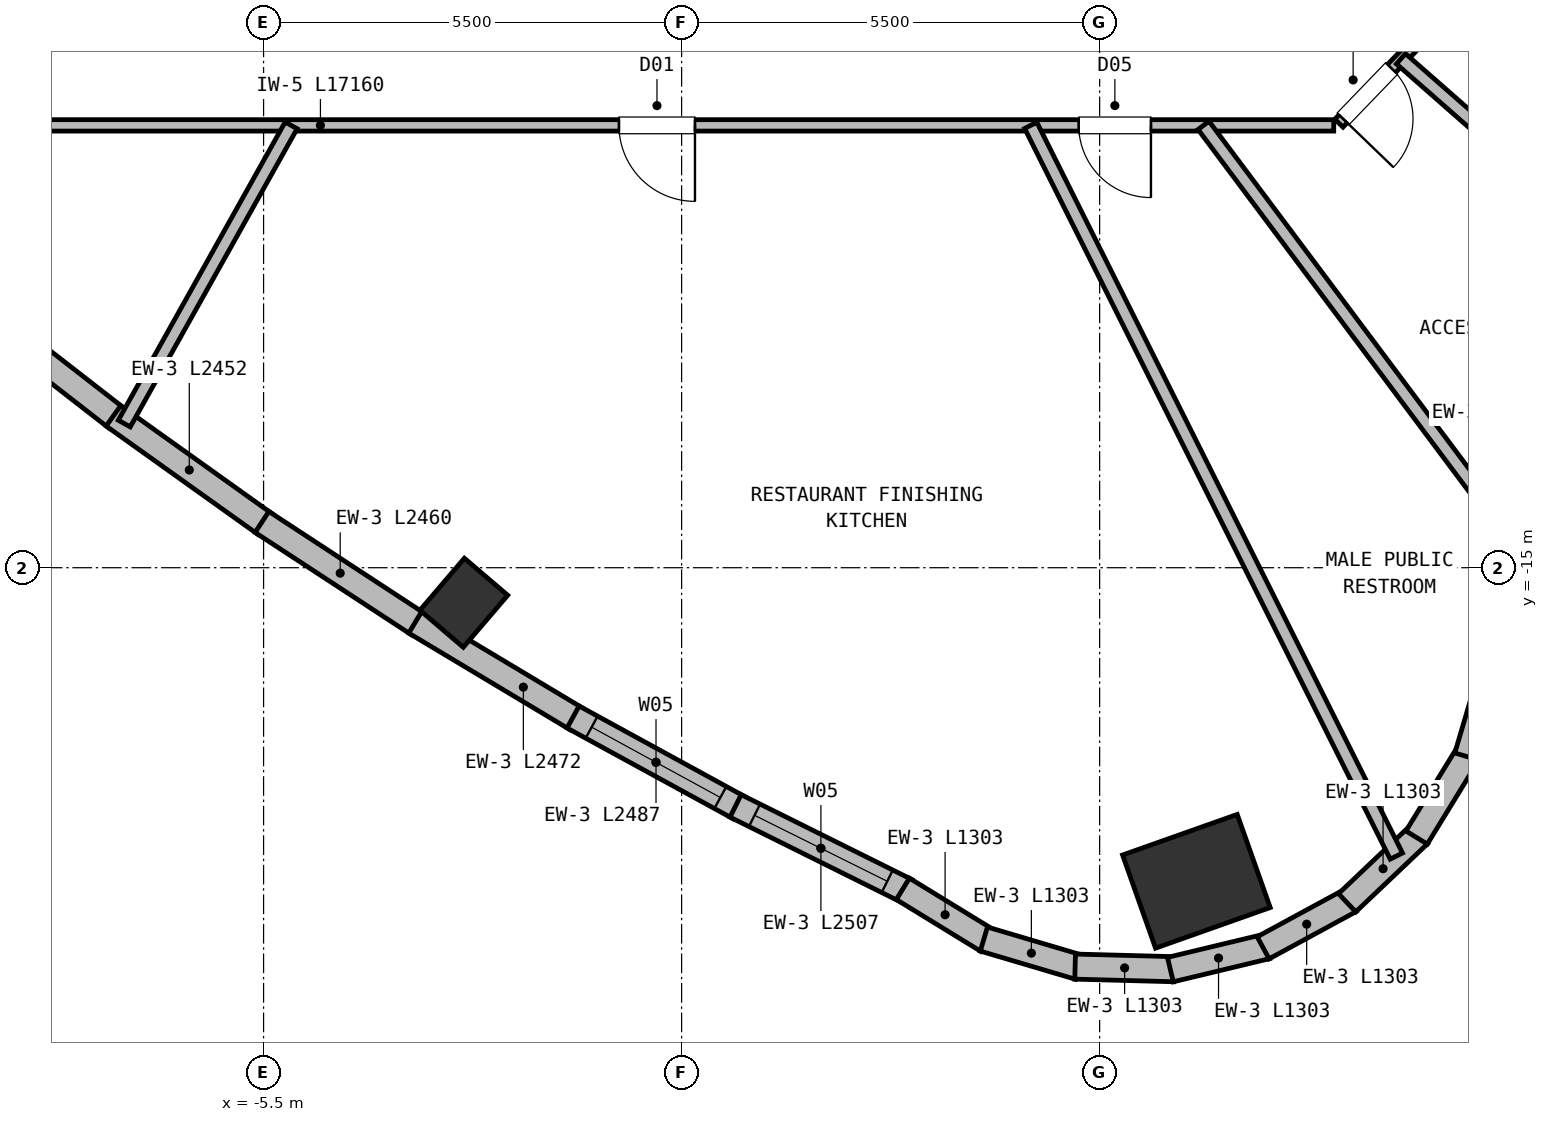
"""IFC4 building model, lengths in metres.
Left out: names, types, materials, properties, quantities, classifications, styles, units other than length and angle.
Written with IfcOpenShell. Run it as: python <this file> out.ifc"""

import sys

from ifc_helpers import new_model, si_unit, direction, frame, frame_2d, origin, origin_2d, place, context, subcontext, project, spatial, rectangle, extrude, element, fill, save


model = new_model("IFC4")
c1 = context("Model", 3, precision=1e-05, world=origin(), true_north=direction((0.0, 1.0)))
c2 = subcontext(c1, "Body", "Model", "MODEL_VIEW")
j1 = project(units=[si_unit("LENGTHUNIT", "METRE"), si_unit("PLANEANGLEUNIT", "RADIAN")], contexts=[c1])
p1 = place(None, origin())
s1 = spatial("IfcSite", under=j1, at=p1, CompositionType="ELEMENT")
p2 = place(p1, origin())
s2 = spatial("IfcBuilding", under=s1, at=p2, CompositionType="ELEMENT")
p3 = place(p2, frame((0.0, 0.0, 277.2)))
s3 = spatial("IfcBuildingStorey", under=s2, at=p3, CompositionType="ELEMENT", Elevation=277.2)
p4 = place(p3, frame((-2.865, -15.461, 0.0), z_axis=(0.0, 0.0, 1.0), x_axis=(-0.7604059656, 0.64944804833, 0.0)))
e1 = element("IfcColumn", 1, at=p4, inside=s3, PredefinedType="COLUMN", context=c2, shape_type="SweptSolid", body=[
    extrude(rectangle(XDim=0.75, YDim=0.9, at=origin_2d()), origin(), (0.0, 0.0, 1.0), 4.4),
])
p5 = place(p3, frame((6.773, -19.126, 0.0), z_axis=(0.0, 0.0, 1.0), x_axis=(-0.333806859234, 0.942641491092, 0.0)))
e2 = element("IfcColumn", 2, at=p5, inside=s3, PredefinedType="COLUMN", context=c2, shape_type="SweptSolid", body=[
    extrude(rectangle(XDim=1.3, YDim=1.6, at=origin_2d()), origin(), (0.0, 0.0, 1.0), 4.4),
])
p6 = place(p3, frame((-7.435, -13.031, 0.0), z_axis=(0.0, 0.0, 1.0), x_axis=(-0.789786954421, 0.613381257152, 0.0)))
e3 = element("IfcWall", 3, at=p6, inside=s3, PredefinedType="SOLIDWALL", context=c2, shape_type="SweptSolid", body=[
    extrude(rectangle(XDim=2.448, YDim=0.33, at=frame_2d((1.224, 0.0))), origin(), (0.0, 0.0, 1.0), 4.15),
])
p7 = place(p3, frame((-5.48, -14.427, 0.0), z_axis=(0.0, 0.0, 1.0), x_axis=(-0.813854547638, 0.581068649378, 0.0)))
e4 = element("IfcWall", 4, at=p7, inside=s3, PredefinedType="SOLIDWALL", context=c2, shape_type="SweptSolid", body=[
    extrude(rectangle(XDim=2.452, YDim=0.33, at=frame_2d((1.226, 0.0))), origin(), (0.0, 0.0, 1.0), 4.15),
])
p8 = place(p3, frame((-3.463, -15.746, 0.0), z_axis=(0.0, 0.0, 1.0), x_axis=(-0.8366477668, 0.547741284101, 0.0)))
e5 = element("IfcWall", 5, at=p8, inside=s3, PredefinedType="SOLIDWALL", context=c2, shape_type="SweptSolid", body=[
    extrude(rectangle(XDim=2.46, YDim=0.33, at=frame_2d((1.23, 0.0))), origin(), (0.0, 0.0, 1.0), 4.15),
])
p9 = place(p3, frame((-1.385, -16.989, 0.0), z_axis=(0.0, 0.0, 1.0), x_axis=(-0.857841338579, 0.513914621143, 0.0)))
e6 = element("IfcWall", 6, at=p9, inside=s3, PredefinedType="SOLIDWALL", context=c2, shape_type="SweptSolid", body=[
    extrude(rectangle(XDim=2.472, YDim=0.33, at=frame_2d((1.236, 0.0))), origin(), (0.0, 0.0, 1.0), 4.15),
])
p10 = place(p3, frame((0.754, -18.157, 0.0), z_axis=(0.0, 0.0, 1.0), x_axis=(-0.877475074231, 0.479622241044, 0.0)))
e7 = element("IfcWall", 7, at=p10, inside=s3, PredefinedType="SOLIDWALL", context=c2, shape_type="SweptSolid", body=[
    extrude(rectangle(XDim=2.487, YDim=0.33, at=frame_2d((1.244, 0.0))), origin(), (0.0, 0.0, 1.0), 4.15),
])
p11 = place(p10, frame((0.279, 0.0, 0.72)))
e8 = element("IfcOpeningElement", 8, at=p11, cuts=e7, PredefinedType="OPENING", context=c2, shape_type="SweptSolid", body=[
    extrude(rectangle(XDim=1.93, YDim=2.15, at=frame_2d((0.965, 1.075))), frame((0.0, 0.175, 0.0), z_axis=(0.0, -1.0, 0.0), x_axis=(1.0, 0.0, 0.0)), (0.0, 0.0, 1.0), 0.35),
])
p12 = place(p3, frame((2.955, -19.25, 0.0), z_axis=(0.0, 0.0, 1.0), x_axis=(-0.895515434076, 0.445030456634, 0.0)))
e9 = element("IfcWall", 9, at=p12, inside=s3, PredefinedType="SOLIDWALL", context=c2, shape_type="SweptSolid", body=[
    extrude(rectangle(XDim=2.507, YDim=0.33, at=frame_2d((1.253, 0.0))), origin(), (0.0, 0.0, 1.0), 4.15),
])
p13 = place(p12, frame((0.278, 0.0, 0.72)))
e10 = element("IfcOpeningElement", 10, at=p13, cuts=e9, PredefinedType="OPENING", context=c2, shape_type="SweptSolid", body=[
    extrude(rectangle(XDim=1.95, YDim=2.15, at=frame_2d((0.975, 1.075))), frame((0.0, 0.175, 0.0), z_axis=(0.0, -1.0, 0.0), x_axis=(1.0, 0.0, 0.0)), (0.0, 0.0, 1.0), 0.35),
])
for number, where, z_axis, x_axis in (
    (11, (4.022, -19.906, 0.0), (0.0, 0.0, 1.0), (-0.853, 0.523, 0.0)),
    (12, (5.226, -20.256, 0.0), (0.0, 0.0, 1.0), (-0.959, 0.284, 0.0)),
):
    element("IfcWall", number, at=place(p3, frame(where, z_axis=z_axis, x_axis=x_axis)), inside=s3, PredefinedType="SOLIDWALL", context=c2, shape_type="SweptSolid", body=[
        extrude(rectangle(XDim=1.303, YDim=0.33, at=frame_2d((0.652, 0.0))), origin(), (0.0, 0.0, 1.0), 4.15),
    ])
for number, where, z_axis, x_axis in (
    (13, (6.48, -20.283, 0.0), (0.0, 0.0, 1.0), (-1.0, 0.026, 0.0)),
    (14, (7.698, -19.984, 0.0), (0.0, 0.0, 1.0), (-0.972, -0.233, 0.0)),
    (15, (8.796, -19.38, 0.0), (0.0, 0.0, 1.0), (-0.879, -0.477, 0.0)),
):
    element("IfcWall", number, at=place(p3, frame(where, z_axis=z_axis, x_axis=x_axis)), inside=s3, PredefinedType="SOLIDWALL", context=c2, shape_type="SweptSolid", body=[
        extrude(rectangle(XDim=1.303, YDim=0.33, at=frame_2d((0.651, 0.0))), origin(), (0.0, 0.0, 1.0), 4.15),
    ])
p14 = place(p3, frame((9.701, -18.512, 0.0), z_axis=(0.0, 0.0, 1.0), x_axis=(-0.725415712612, -0.688311008118, 0.0)))
e16 = element("IfcWall", 16, at=p14, inside=s3, PredefinedType="SOLIDWALL", context=c2, shape_type="SweptSolid", body=[
    extrude(rectangle(XDim=1.303, YDim=0.33, at=frame_2d((0.651, 0.0))), origin(), (0.0, 0.0, 1.0), 4.15),
])
p15 = place(p3, frame((10.351, -17.439, 0.0), z_axis=(0.0, 0.0, 1.0), x_axis=(-0.522601602676, -0.852577014047, 0.0)))
e17 = element("IfcWall", 17, at=p15, inside=s3, PredefinedType="SOLIDWALL", context=c2, shape_type="SweptSolid", body=[
    extrude(rectangle(XDim=1.303, YDim=0.33, at=frame_2d((0.651, 0.0))), origin(), (0.0, 0.0, 1.0), 4.15),
])
p16 = place(p3, frame((10.701, -16.235, 0.0), z_axis=(0.0, 0.0, 1.0), x_axis=(-0.284011785169, -0.958820789243, 0.0)))
e18 = element("IfcWall", 18, at=p16, inside=s3, PredefinedType="SOLIDWALL", context=c2, shape_type="SweptSolid", body=[
    extrude(rectangle(XDim=1.303, YDim=0.33, at=frame_2d((0.652, 0.0))), origin(), (0.0, 0.0, 1.0), 4.15),
])
p17 = place(p3, frame((8.58, -9.18, 0.0), z_axis=(0.0, 0.0, 1.0), x_axis=(-1.0, 0.0, 0.0)))
e19 = element("IfcWall", 19, at=p17, inside=s3, PredefinedType="PARTITIONING", context=c2, shape_type="SweptSolid", body=[
    extrude(rectangle(XDim=17.16, YDim=0.15, at=frame_2d((8.58, 0.0))), origin(), (0.0, 0.0, 1.0), 3.86),
])
p18 = place(p17, frame((2.405, 0.0, 0.0)))
e20 = element("IfcOpeningElement", 20, at=p18, cuts=e19, PredefinedType="OPENING", context=c2, shape_type="SweptSolid", body=[
    extrude(rectangle(XDim=0.95, YDim=2.1, at=frame_2d((0.475, 1.05))), frame((0.0, 0.085, 0.0), z_axis=(0.0, -1.0, 0.0), x_axis=(1.0, 0.0, 0.0)), (0.0, 0.0, 1.0), 0.17),
])
p19 = place(p17, frame((8.404, 0.0, 0.0)))
e21 = element("IfcOpeningElement", 21, at=p19, cuts=e19, PredefinedType="OPENING", context=c2, shape_type="SweptSolid", body=[
    extrude(rectangle(XDim=1.0, YDim=2.15, at=frame_2d((0.5, 1.075))), frame((0.0, 0.085, 0.0), z_axis=(0.0, -1.0, 0.0), x_axis=(1.0, 0.0, 0.0)), (0.0, 0.0, 1.0), 0.17),
])
p20 = place(p3, frame((10.422, -7.309, 0.0), z_axis=(0.0, 0.0, 1.0), x_axis=(-0.693764562202, -0.720201869085, 0.0)))
e22 = element("IfcWall", 22, at=p20, inside=s3, PredefinedType="PARTITIONING", context=c2, shape_type="SweptSolid", body=[
    extrude(rectangle(XDim=2.558, YDim=0.15, at=frame_2d((1.279, 0.0))), origin(), (0.0, 0.0, 1.0), 4.15),
])
p21 = place(p20, frame((1.558, 0.0, 0.0)))
e23 = element("IfcOpeningElement", 23, at=p21, cuts=e22, PredefinedType="OPENING", context=c2, shape_type="SweptSolid", body=[
    extrude(rectangle(XDim=0.92, YDim=2.05, at=frame_2d((0.46, 1.025))), frame((0.0, 0.085, 0.0), z_axis=(0.0, -1.0, 0.0), x_axis=(1.0, 0.0, 0.0)), (0.0, 0.0, 1.0), 0.17),
])
p22 = place(p3, frame((9.464, -8.304, 0.0), z_axis=(0.0, 0.0, 1.0), x_axis=(0.75169660728, -0.659509067871, 0.0)))
e24 = element("IfcWall", 24, at=p22, inside=s3, PredefinedType="PARTITIONING", context=c2, shape_type="SweptSolid", body=[
    extrude(rectangle(XDim=4.145, YDim=0.18, at=frame_2d((2.072, 0.0))), origin(), (0.0, 0.0, 1.0), 4.15),
])
p23 = place(p3, frame((-5.137, -9.18, 0.0), z_axis=(0.0, 0.0, 1.0), x_axis=(-0.488323904918, -0.872662457016, 0.0)))
e25 = element("IfcWall", 25, at=p23, inside=s3, PredefinedType="PARTITIONING", context=c2, shape_type="SweptSolid", body=[
    extrude(rectangle(XDim=4.496, YDim=0.18, at=frame_2d((2.248, 0.0))), origin(), (0.0, 0.0, 1.0), 4.15),
])
p24 = place(p3, frame((4.593, -9.18, 0.0), z_axis=(0.0, 0.0, 1.0), x_axis=(0.447458836271, -0.894304528582, 0.0)))
e26 = element("IfcWall", 26, at=p24, inside=s3, PredefinedType="PARTITIONING", context=c2, shape_type="SweptSolid", body=[
    extrude(rectangle(XDim=10.751, YDim=0.18, at=frame_2d((5.375, 0.0))), origin(), (0.0, 0.0, 1.0), 4.15),
])
p25 = place(p3, frame((6.867, -9.18, 0.0), z_axis=(0.0, 0.0, 1.0), x_axis=(0.598984906235, -0.800760315015, 0.0)))
e27 = element("IfcWall", 27, at=p25, inside=s3, PredefinedType="PARTITIONING", context=c2, shape_type="SweptSolid", body=[
    extrude(rectangle(XDim=7.238, YDim=0.18, at=frame_2d((3.619, 0.0))), origin(), (0.0, 0.0, 1.0), 4.15),
])
p26 = place(p11, origin())
e28 = element("IfcWindow", 28, at=p26, inside=s3, PartitioningType="SINGLE_PANEL", PredefinedType="WINDOW", context=c2, shape_type="SweptSolid", body=[
    extrude(rectangle(XDim=1.93, YDim=2.15, at=frame_2d((0.965, 1.075))), frame((0.0, 0.03, 0.0), z_axis=(0.0, -1.0, 0.0), x_axis=(1.0, 0.0, 0.0)), (0.0, 0.0, 1.0), 0.06),
])
fill(e8, e28)
p27 = place(p13, origin())
e29 = element("IfcWindow", 29, at=p27, inside=s3, PartitioningType="SINGLE_PANEL", PredefinedType="WINDOW", context=c2, shape_type="SweptSolid", body=[
    extrude(rectangle(XDim=1.95, YDim=2.15, at=frame_2d((0.975, 1.075))), frame((0.0, 0.03, 0.0), z_axis=(0.0, -1.0, 0.0), x_axis=(1.0, 0.0, 0.0)), (0.0, 0.0, 1.0), 0.06),
])
fill(e10, e29)
p28 = place(p21, origin())
e30 = element("IfcDoor", 30, at=p28, inside=s3, OperationType="SINGLE_SWING_RIGHT", PredefinedType="DOOR", context=c2, shape_type="SweptSolid", body=[
    extrude(rectangle(XDim=0.92, YDim=2.05, at=frame_2d((0.46, 1.025))), frame((0.0, 0.025, 0.0), z_axis=(0.0, -1.0, 0.0), x_axis=(1.0, 0.0, 0.0)), (0.0, 0.0, 1.0), 0.05),
])
fill(e23, e30)
p29 = place(p18, origin())
e31 = element("IfcDoor", 31, at=p29, inside=s3, OperationType="SINGLE_SWING_LEFT", PredefinedType="DOOR", context=c2, shape_type="SweptSolid", body=[
    extrude(rectangle(XDim=0.95, YDim=2.1, at=frame_2d((0.475, 1.05))), frame((0.0, 0.025, 0.0), z_axis=(0.0, -1.0, 0.0), x_axis=(1.0, 0.0, 0.0)), (0.0, 0.0, 1.0), 0.05),
])
fill(e20, e31)
p30 = place(p19, origin())
e32 = element("IfcDoor", 32, at=p30, inside=s3, OperationType="SINGLE_SWING_LEFT", PredefinedType="DOOR", context=c2, shape_type="SweptSolid", body=[
    extrude(rectangle(XDim=1.0, YDim=2.15, at=frame_2d((0.5, 1.075))), frame((0.0, 0.025, 0.0), z_axis=(0.0, -1.0, 0.0), x_axis=(1.0, 0.0, 0.0)), (0.0, 0.0, 1.0), 0.05),
])
fill(e21, e32)
save(model, sys.argv[1])
